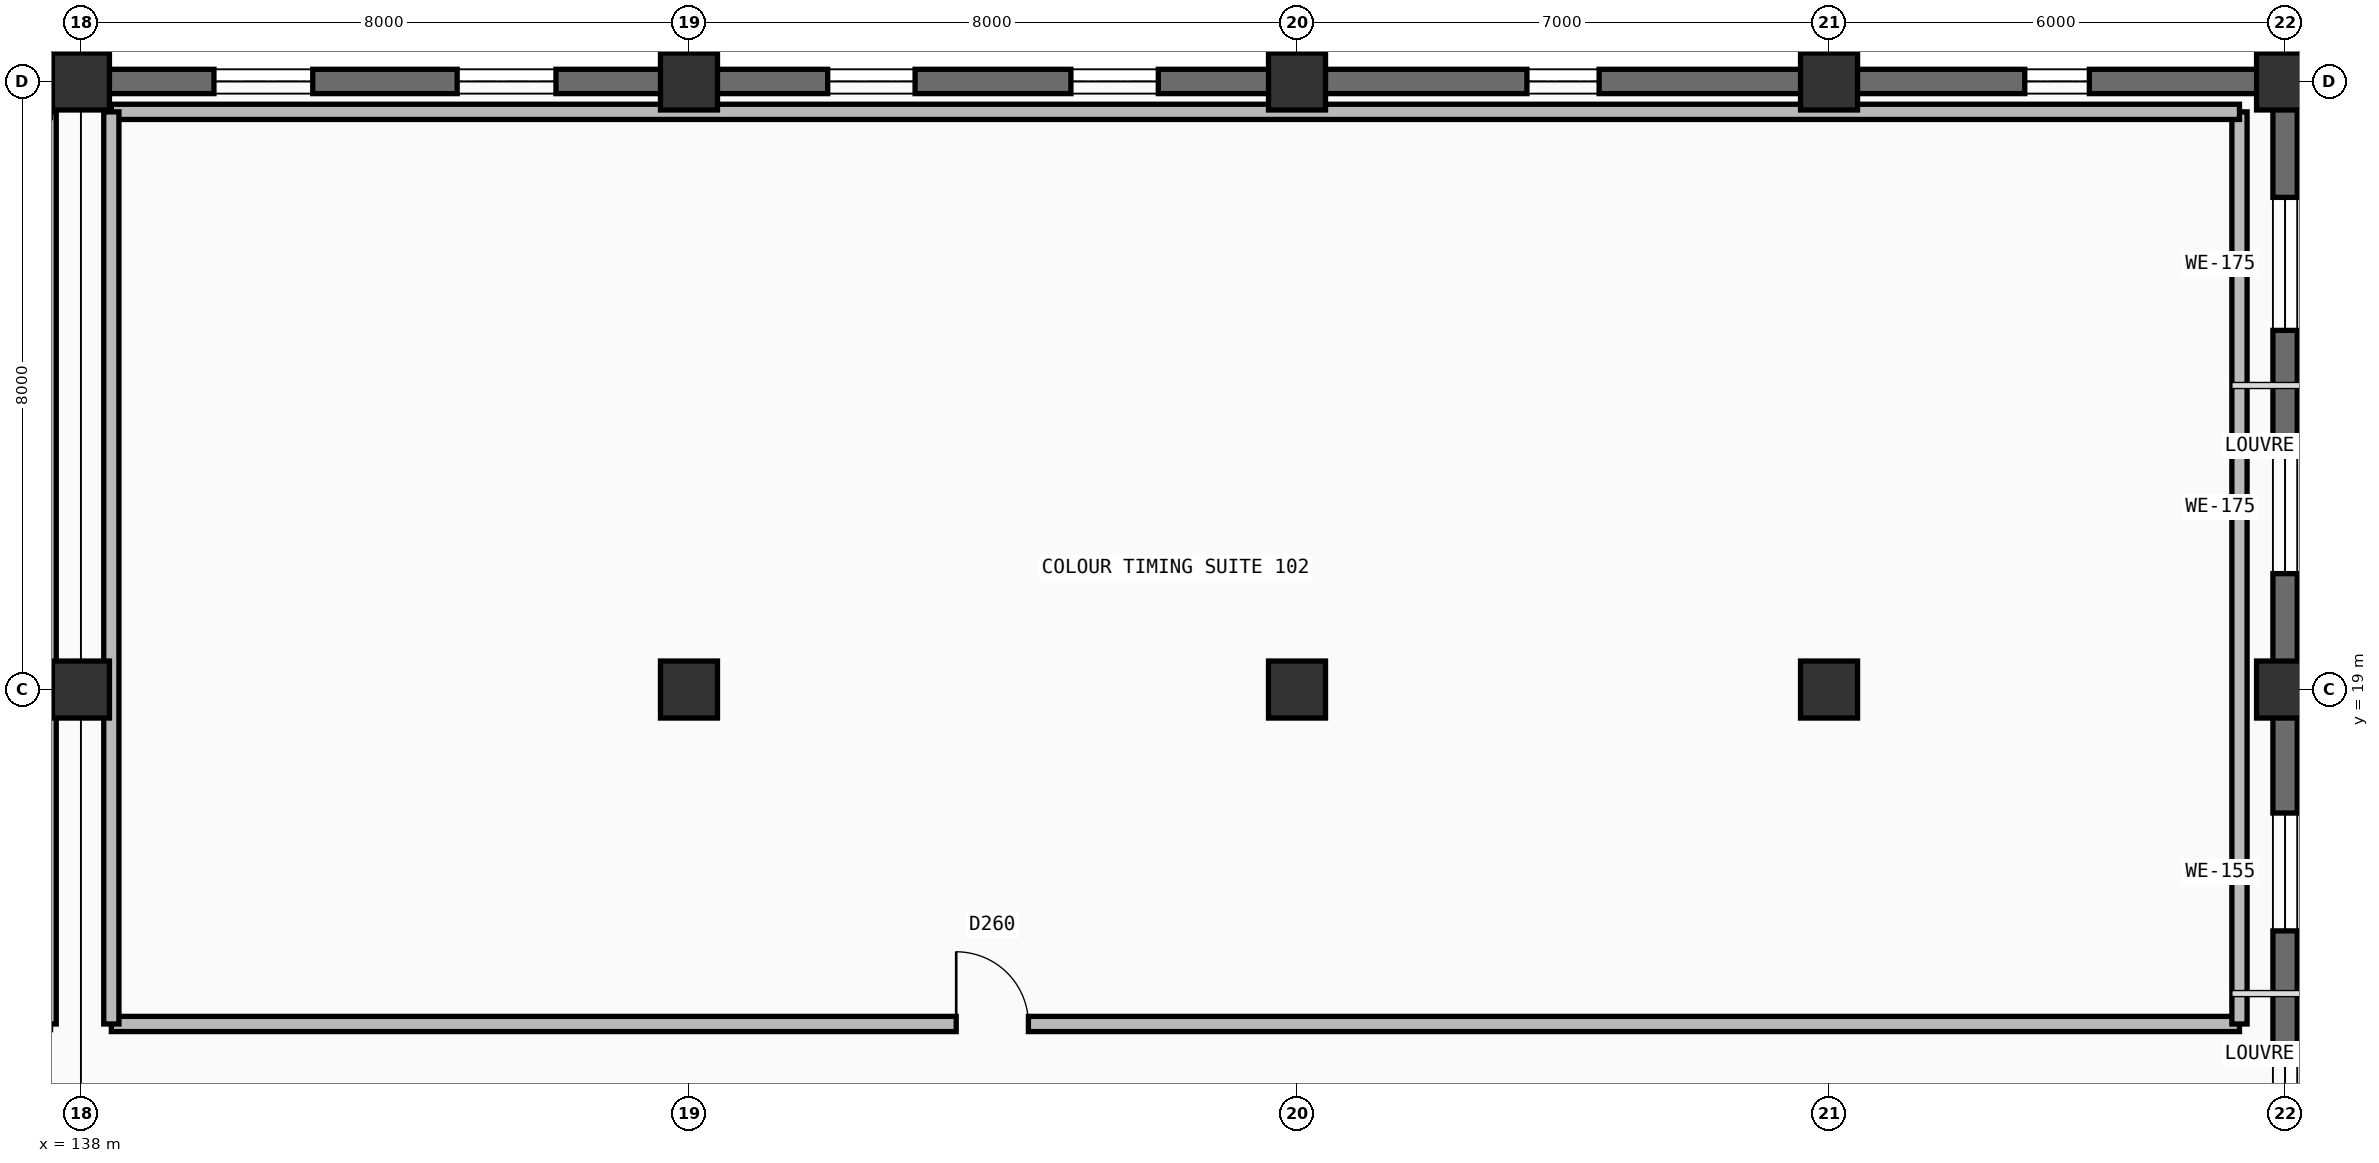
"""IFC4 building model, lengths in metres.
Left out: names, types, materials, properties, quantities, classifications, styles, units other than length and angle.
Written with IfcOpenShell. Run it as: python <this file> out.ifc"""

import sys

from ifc_helpers import new_model, si_unit, direction, frame, frame_2d, origin, origin_2d, place, context, subcontext, project, spatial, rectangle, extrude, element, fill, save


model = new_model("IFC4")
c1 = context("Model", 3, precision=1e-05, world=origin(), true_north=direction((0.0, 1.0)))
c2 = subcontext(c1, "Body", "Model", "MODEL_VIEW")
j1 = project(units=[si_unit("LENGTHUNIT", "METRE"), si_unit("PLANEANGLEUNIT", "RADIAN")], contexts=[c1])
p1 = place(None, origin())
s1 = spatial("IfcSite", under=j1, at=p1, CompositionType="ELEMENT")
p2 = place(p1, origin())
s2 = spatial("IfcBuilding", under=s1, at=p2, CompositionType="ELEMENT")
p3 = place(p2, frame((0.0, 0.0, 5.4)))
s3 = spatial("IfcBuildingStorey", under=s2, at=p3, CompositionType="ELEMENT", Elevation=5.4)
for number, where, z_axis, x_axis in (
    (1, (138.0, 19.0, 0.0), (0.0, 0.0, 1.0), (1.0, 0.0, 0.0)),
    (2, (138.0, 27.0, 0.0), (0.0, 0.0, 1.0), (1.0, 0.0, 0.0)),
    (3, (146.0, 19.0, 0.0), (0.0, 0.0, 1.0), (1.0, 0.0, 0.0)),
    (4, (146.0, 27.0, 0.0), (0.0, 0.0, 1.0), (1.0, 0.0, 0.0)),
    (5, (154.0, 19.0, 0.0), (0.0, 0.0, 1.0), (1.0, 0.0, 0.0)),
    (6, (154.0, 27.0, 0.0), (0.0, 0.0, 1.0), (1.0, 0.0, 0.0)),
    (7, (161.0, 19.0, 0.0), (0.0, 0.0, 1.0), (1.0, 0.0, 0.0)),
    (8, (161.0, 27.0, 0.0), (0.0, 0.0, 1.0), (1.0, 0.0, 0.0)),
    (9, (167.0, 19.0, 0.0), (0.0, 0.0, 1.0), (1.0, 0.0, 0.0)),
    (10, (167.0, 27.0, 0.0), (0.0, 0.0, 1.0), (1.0, 0.0, 0.0)),
):
    element("IfcColumn", number, at=place(p3, frame(where, z_axis=z_axis, x_axis=x_axis)), inside=s3, PredefinedType="COLUMN", context=c2, shape_type="SweptSolid", body=[
        extrude(rectangle(XDim=0.75, YDim=0.75, at=origin_2d()), origin(), (0.0, 0.0, 1.0), 4.5),
    ])
p4 = place(p3, frame((130.0, 27.0, 0.0), z_axis=(0.0, 0.0, 1.0), x_axis=(1.0, 0.0, 0.0)))
e11 = element("IfcWall", 11, at=p4, inside=s3, PredefinedType="SOLIDWALL", context=c2, shape_type="SweptSolid", body=[
    extrude(rectangle(XDim=8.0, YDim=0.32, at=frame_2d((4.0, 0.0))), origin(), (0.0, 0.0, 1.0), 4.5),
])
p5 = place(p4, frame((1.675, 0.0, 1.0)))
e12 = element("IfcOpeningElement", 12, at=p5, cuts=e11, PredefinedType="OPENING", context=c2, shape_type="SweptSolid", body=[
    extrude(rectangle(XDim=1.45, YDim=1.85, at=frame_2d((0.725, 0.925))), frame((0.0, 0.17, 0.0), z_axis=(0.0, -1.0, 0.0), x_axis=(1.0, 0.0, 0.0)), (0.0, 0.0, 1.0), 0.34),
])
p6 = place(p4, frame((4.875, 0.0, 1.0)))
e13 = element("IfcOpeningElement", 13, at=p6, cuts=e11, PredefinedType="OPENING", context=c2, shape_type="SweptSolid", body=[
    extrude(rectangle(XDim=1.45, YDim=1.85, at=frame_2d((0.725, 0.925))), frame((0.0, 0.17, 0.0), z_axis=(0.0, -1.0, 0.0), x_axis=(1.0, 0.0, 0.0)), (0.0, 0.0, 1.0), 0.34),
])
p7 = place(p3, frame((138.0, 27.0, 0.0), z_axis=(0.0, 0.0, 1.0), x_axis=(1.0, 0.0, 0.0)))
e14 = element("IfcWall", 14, at=p7, inside=s3, PredefinedType="SOLIDWALL", context=c2, shape_type="SweptSolid", body=[
    extrude(rectangle(XDim=8.0, YDim=0.32, at=frame_2d((4.0, 0.0))), origin(), (0.0, 0.0, 1.0), 4.5),
])
p8 = place(p7, frame((1.75, 0.0, 1.0)))
e15 = element("IfcOpeningElement", 15, at=p8, cuts=e14, PredefinedType="OPENING", context=c2, shape_type="SweptSolid", body=[
    extrude(rectangle(XDim=1.3, YDim=1.7, at=frame_2d((0.65, 0.85))), frame((0.0, 0.17, 0.0), z_axis=(0.0, -1.0, 0.0), x_axis=(1.0, 0.0, 0.0)), (0.0, 0.0, 1.0), 0.34),
])
p9 = place(p7, frame((4.95, 0.0, 1.0)))
e16 = element("IfcOpeningElement", 16, at=p9, cuts=e14, PredefinedType="OPENING", context=c2, shape_type="SweptSolid", body=[
    extrude(rectangle(XDim=1.3, YDim=1.7, at=frame_2d((0.65, 0.85))), frame((0.0, 0.17, 0.0), z_axis=(0.0, -1.0, 0.0), x_axis=(1.0, 0.0, 0.0)), (0.0, 0.0, 1.0), 0.34),
])
p10 = place(p3, frame((146.0, 27.0, 0.0), z_axis=(0.0, 0.0, 1.0), x_axis=(1.0, 0.0, 0.0)))
e17 = element("IfcWall", 17, at=p10, inside=s3, PredefinedType="SOLIDWALL", context=c2, shape_type="SweptSolid", body=[
    extrude(rectangle(XDim=8.0, YDim=0.32, at=frame_2d((4.0, 0.0))), origin(), (0.0, 0.0, 1.0), 4.5),
])
p11 = place(p10, frame((1.825, 0.0, 1.0)))
e18 = element("IfcOpeningElement", 18, at=p11, cuts=e17, PredefinedType="OPENING", context=c2, shape_type="SweptSolid", body=[
    extrude(rectangle(XDim=1.15, YDim=1.55, at=frame_2d((0.575, 0.775))), frame((0.0, 0.17, 0.0), z_axis=(0.0, -1.0, 0.0), x_axis=(1.0, 0.0, 0.0)), (0.0, 0.0, 1.0), 0.34),
])
p12 = place(p10, frame((5.025, 0.0, 1.0)))
e19 = element("IfcOpeningElement", 19, at=p12, cuts=e17, PredefinedType="OPENING", context=c2, shape_type="SweptSolid", body=[
    extrude(rectangle(XDim=1.15, YDim=1.55, at=frame_2d((0.575, 0.775))), frame((0.0, 0.17, 0.0), z_axis=(0.0, -1.0, 0.0), x_axis=(1.0, 0.0, 0.0)), (0.0, 0.0, 1.0), 0.34),
])
p13 = place(p3, frame((154.0, 27.0, 0.0), z_axis=(0.0, 0.0, 1.0), x_axis=(1.0, 0.0, 0.0)))
e20 = element("IfcWall", 20, at=p13, inside=s3, PredefinedType="SOLIDWALL", context=c2, shape_type="SweptSolid", body=[
    extrude(rectangle(XDim=7.0, YDim=0.32, at=frame_2d((3.5, 0.0))), origin(), (0.0, 0.0, 1.0), 4.5),
])
p14 = place(p13, frame((3.025, 0.0, 1.0)))
e21 = element("IfcOpeningElement", 21, at=p14, cuts=e20, PredefinedType="OPENING", context=c2, shape_type="SweptSolid", body=[
    extrude(rectangle(XDim=0.95, YDim=1.35, at=frame_2d((0.475, 0.675))), frame((0.0, 0.17, 0.0), z_axis=(0.0, -1.0, 0.0), x_axis=(1.0, 0.0, 0.0)), (0.0, 0.0, 1.0), 0.34),
])
p15 = place(p3, frame((161.0, 27.0, 0.0), z_axis=(0.0, 0.0, 1.0), x_axis=(1.0, 0.0, 0.0)))
e22 = element("IfcWall", 22, at=p15, inside=s3, PredefinedType="SOLIDWALL", context=c2, shape_type="SweptSolid", body=[
    extrude(rectangle(XDim=6.0, YDim=0.32, at=frame_2d((3.0, 0.0))), origin(), (0.0, 0.0, 1.0), 4.5),
])
p16 = place(p15, frame((2.575, 0.0, 1.0)))
e23 = element("IfcOpeningElement", 23, at=p16, cuts=e22, PredefinedType="OPENING", context=c2, shape_type="SweptSolid", body=[
    extrude(rectangle(XDim=0.85, YDim=1.2, at=frame_2d((0.425, 0.6))), frame((0.0, 0.17, 0.0), z_axis=(0.0, -1.0, 0.0), x_axis=(1.0, 0.0, 0.0)), (0.0, 0.0, 1.0), 0.34),
])
p17 = place(p3, frame((167.0, 27.0, 0.0), z_axis=(0.0, 0.0, 1.0), x_axis=(0.0, -1.0, 0.0)))
e24 = element("IfcWall", 24, at=p17, inside=s3, PredefinedType="SOLIDWALL", context=c2, shape_type="SweptSolid", body=[
    extrude(rectangle(XDim=8.0, YDim=0.32, at=frame_2d((4.0, 0.0))), origin(), (0.0, 0.0, 1.0), 4.5),
])
p18 = place(p17, frame((1.525, 0.0, 1.0)))
e25 = element("IfcOpeningElement", 25, at=p18, cuts=e24, PredefinedType="OPENING", context=c2, shape_type="SweptSolid", body=[
    extrude(rectangle(XDim=1.75, YDim=2.1, at=frame_2d((0.875, 1.05))), frame((0.0, 0.17, 0.0), z_axis=(0.0, -1.0, 0.0), x_axis=(1.0, 0.0, 0.0)), (0.0, 0.0, 1.0), 0.34),
])
p19 = place(p17, frame((4.725, 0.0, 1.0)))
e26 = element("IfcOpeningElement", 26, at=p19, cuts=e24, PredefinedType="OPENING", context=c2, shape_type="SweptSolid", body=[
    extrude(rectangle(XDim=1.75, YDim=2.1, at=frame_2d((0.875, 1.05))), frame((0.0, 0.17, 0.0), z_axis=(0.0, -1.0, 0.0), x_axis=(1.0, 0.0, 0.0)), (0.0, 0.0, 1.0), 0.34),
])
p20 = place(p3, frame((167.0, 19.0, 0.0), z_axis=(0.0, 0.0, 1.0), x_axis=(0.0, -1.0, 0.0)))
e27 = element("IfcWall", 27, at=p20, inside=s3, PredefinedType="SOLIDWALL", context=c2, shape_type="SweptSolid", body=[
    extrude(rectangle(XDim=8.0, YDim=0.32, at=frame_2d((4.0, 0.0))), origin(), (0.0, 0.0, 1.0), 4.5),
])
p21 = place(p20, frame((1.625, 0.0, 1.0)))
e28 = element("IfcOpeningElement", 28, at=p21, cuts=e27, PredefinedType="OPENING", context=c2, shape_type="SweptSolid", body=[
    extrude(rectangle(XDim=1.55, YDim=1.95, at=frame_2d((0.775, 0.975))), frame((0.0, 0.17, 0.0), z_axis=(0.0, -1.0, 0.0), x_axis=(1.0, 0.0, 0.0)), (0.0, 0.0, 1.0), 0.34),
])
p22 = place(p20, frame((4.825, 0.0, 1.0)))
e29 = element("IfcOpeningElement", 29, at=p22, cuts=e27, PredefinedType="OPENING", context=c2, shape_type="SweptSolid", body=[
    extrude(rectangle(XDim=1.55, YDim=1.95, at=frame_2d((0.775, 0.975))), frame((0.0, 0.17, 0.0), z_axis=(0.0, -1.0, 0.0), x_axis=(1.0, 0.0, 0.0)), (0.0, 0.0, 1.0), 0.34),
])
p23 = place(p3, frame((137.6, 14.6, 0.0), z_axis=(0.0, 0.0, 1.0), x_axis=(0.0, 1.0, 0.0)))
e30 = element("IfcWall", 30, at=p23, inside=s3, PredefinedType="PARTITIONING", context=c2, shape_type="SweptSolid", body=[
    extrude(rectangle(XDim=12.0, YDim=0.15, at=frame_2d((6.0, 0.0))), origin(), (0.0, 0.0, 1.0), 3.485),
])
p24 = place(p3, frame((138.4, 14.6, 0.0), z_axis=(0.0, 0.0, 1.0), x_axis=(1.0, 0.0, 0.0)))
e31 = element("IfcWall", 31, at=p24, inside=s3, PredefinedType="PARTITIONING", context=c2, shape_type="SweptSolid", body=[
    extrude(rectangle(XDim=28.0, YDim=0.2, at=frame_2d((14.0, 0.0))), origin(), (0.0, 0.0, 1.0), 4.2),
])
p25 = place(p24, frame((11.116, 0.0, 0.0)))
e32 = element("IfcOpeningElement", 32, at=p25, cuts=e31, PredefinedType="OPENING", context=c2, shape_type="SweptSolid", body=[
    extrude(rectangle(XDim=0.95, YDim=2.1, at=frame_2d((0.475, 1.05))), frame((0.0, 0.11, 0.0), z_axis=(0.0, -1.0, 0.0), x_axis=(1.0, 0.0, 0.0)), (0.0, 0.0, 1.0), 0.22),
])
p26 = place(p3, frame((166.4, 14.6, 0.0), z_axis=(0.0, 0.0, 1.0), x_axis=(0.0, 1.0, 0.0)))
e33 = element("IfcWall", 33, at=p26, inside=s3, PredefinedType="PARTITIONING", context=c2, shape_type="SweptSolid", body=[
    extrude(rectangle(XDim=12.0, YDim=0.2, at=frame_2d((6.0, 0.0))), origin(), (0.0, 0.0, 1.0), 4.2),
])
p27 = place(p3, frame((138.4, 26.6, 0.0), z_axis=(0.0, 0.0, 1.0), x_axis=(1.0, 0.0, 0.0)))
e34 = element("IfcWall", 34, at=p27, inside=s3, PredefinedType="PARTITIONING", context=c2, shape_type="SweptSolid", body=[
    extrude(rectangle(XDim=28.0, YDim=0.2, at=frame_2d((14.0, 0.0))), origin(), (0.0, 0.0, 1.0), 3.505),
])
p28 = place(p3, frame((138.4, 14.6, 0.0), z_axis=(0.0, 0.0, 1.0), x_axis=(0.0, 1.0, 0.0)))
e35 = element("IfcWall", 35, at=p28, inside=s3, PredefinedType="PARTITIONING", context=c2, shape_type="SweptSolid", body=[
    extrude(rectangle(XDim=12.0, YDim=0.2, at=frame_2d((6.0, 0.0))), origin(), (0.0, 0.0, 1.0), 3.485),
])
p29 = place(p8, origin())
e36 = element("IfcWindow", 36, at=p29, inside=s3, PartitioningType="SINGLE_PANEL", PredefinedType="WINDOW", context=c2, shape_type="SweptSolid", body=[
    extrude(rectangle(XDim=1.3, YDim=1.7, at=frame_2d((0.65, 0.85))), frame((0.0, 0.03, 0.0), z_axis=(0.0, -1.0, 0.0), x_axis=(1.0, 0.0, 0.0)), (0.0, 0.0, 1.0), 0.06),
])
fill(e15, e36)
p30 = place(p9, origin())
e37 = element("IfcWindow", 37, at=p30, inside=s3, PartitioningType="SINGLE_PANEL", PredefinedType="WINDOW", context=c2, shape_type="SweptSolid", body=[
    extrude(rectangle(XDim=1.3, YDim=1.7, at=frame_2d((0.65, 0.85))), frame((0.0, 0.03, 0.0), z_axis=(0.0, -1.0, 0.0), x_axis=(1.0, 0.0, 0.0)), (0.0, 0.0, 1.0), 0.06),
])
fill(e16, e37)
p31 = place(p11, origin())
e38 = element("IfcWindow", 38, at=p31, inside=s3, PartitioningType="SINGLE_PANEL", PredefinedType="WINDOW", context=c2, shape_type="SweptSolid", body=[
    extrude(rectangle(XDim=1.15, YDim=1.55, at=frame_2d((0.575, 0.775))), frame((0.0, 0.03, 0.0), z_axis=(0.0, -1.0, 0.0), x_axis=(1.0, 0.0, 0.0)), (0.0, 0.0, 1.0), 0.06),
])
fill(e18, e38)
p32 = place(p12, origin())
e39 = element("IfcWindow", 39, at=p32, inside=s3, PartitioningType="SINGLE_PANEL", PredefinedType="WINDOW", context=c2, shape_type="SweptSolid", body=[
    extrude(rectangle(XDim=1.15, YDim=1.55, at=frame_2d((0.575, 0.775))), frame((0.0, 0.03, 0.0), z_axis=(0.0, -1.0, 0.0), x_axis=(1.0, 0.0, 0.0)), (0.0, 0.0, 1.0), 0.06),
])
fill(e19, e39)
p33 = place(p14, origin())
e40 = element("IfcWindow", 40, at=p33, inside=s3, PartitioningType="SINGLE_PANEL", PredefinedType="WINDOW", context=c2, shape_type="SweptSolid", body=[
    extrude(rectangle(XDim=0.95, YDim=1.35, at=frame_2d((0.475, 0.675))), frame((0.0, 0.03, 0.0), z_axis=(0.0, -1.0, 0.0), x_axis=(1.0, 0.0, 0.0)), (0.0, 0.0, 1.0), 0.06),
])
fill(e21, e40)
p34 = place(p16, origin())
e41 = element("IfcWindow", 41, at=p34, inside=s3, PartitioningType="SINGLE_PANEL", PredefinedType="WINDOW", context=c2, shape_type="SweptSolid", body=[
    extrude(rectangle(XDim=0.85, YDim=1.2, at=frame_2d((0.425, 0.6))), frame((0.0, 0.03, 0.0), z_axis=(0.0, -1.0, 0.0), x_axis=(1.0, 0.0, 0.0)), (0.0, 0.0, 1.0), 0.06),
])
fill(e23, e41)
p35 = place(p18, origin())
e42 = element("IfcWindow", 42, at=p35, inside=s3, PartitioningType="SINGLE_PANEL", PredefinedType="WINDOW", context=c2, shape_type="SweptSolid", body=[
    extrude(rectangle(XDim=1.75, YDim=2.1, at=frame_2d((0.875, 1.05))), frame((0.0, 0.03, 0.0), z_axis=(0.0, -1.0, 0.0), x_axis=(1.0, 0.0, 0.0)), (0.0, 0.0, 1.0), 0.06),
])
fill(e25, e42)
p36 = place(p19, origin())
e43 = element("IfcWindow", 43, at=p36, inside=s3, PartitioningType="SINGLE_PANEL", PredefinedType="WINDOW", context=c2, shape_type="SweptSolid", body=[
    extrude(rectangle(XDim=1.75, YDim=2.1, at=frame_2d((0.875, 1.05))), frame((0.0, 0.03, 0.0), z_axis=(0.0, -1.0, 0.0), x_axis=(1.0, 0.0, 0.0)), (0.0, 0.0, 1.0), 0.06),
])
fill(e26, e43)
p37 = place(p21, origin())
e44 = element("IfcWindow", 44, at=p37, inside=s3, PartitioningType="SINGLE_PANEL", PredefinedType="WINDOW", context=c2, shape_type="SweptSolid", body=[
    extrude(rectangle(XDim=1.55, YDim=1.95, at=frame_2d((0.775, 0.975))), frame((0.0, 0.03, 0.0), z_axis=(0.0, -1.0, 0.0), x_axis=(1.0, 0.0, 0.0)), (0.0, 0.0, 1.0), 0.06),
])
fill(e28, e44)
p38 = place(p22, origin())
e45 = element("IfcWindow", 45, at=p38, inside=s3, PartitioningType="SINGLE_PANEL", PredefinedType="WINDOW", context=c2, shape_type="SweptSolid", body=[
    extrude(rectangle(XDim=1.55, YDim=1.95, at=frame_2d((0.775, 0.975))), frame((0.0, 0.03, 0.0), z_axis=(0.0, -1.0, 0.0), x_axis=(1.0, 0.0, 0.0)), (0.0, 0.0, 1.0), 0.06),
])
fill(e29, e45)
p39 = place(p25, origin())
e46 = element("IfcDoor", 46, at=p39, inside=s3, OperationType="SINGLE_SWING_LEFT", PredefinedType="DOOR", context=c2, shape_type="SweptSolid", body=[
    extrude(rectangle(XDim=0.95, YDim=2.1, at=frame_2d((0.475, 1.05))), frame((0.0, 0.025, 0.0), z_axis=(0.0, -1.0, 0.0), x_axis=(1.0, 0.0, 0.0)), (0.0, 0.0, 1.0), 0.05),
])
fill(e32, e46)
save(model, sys.argv[1])
